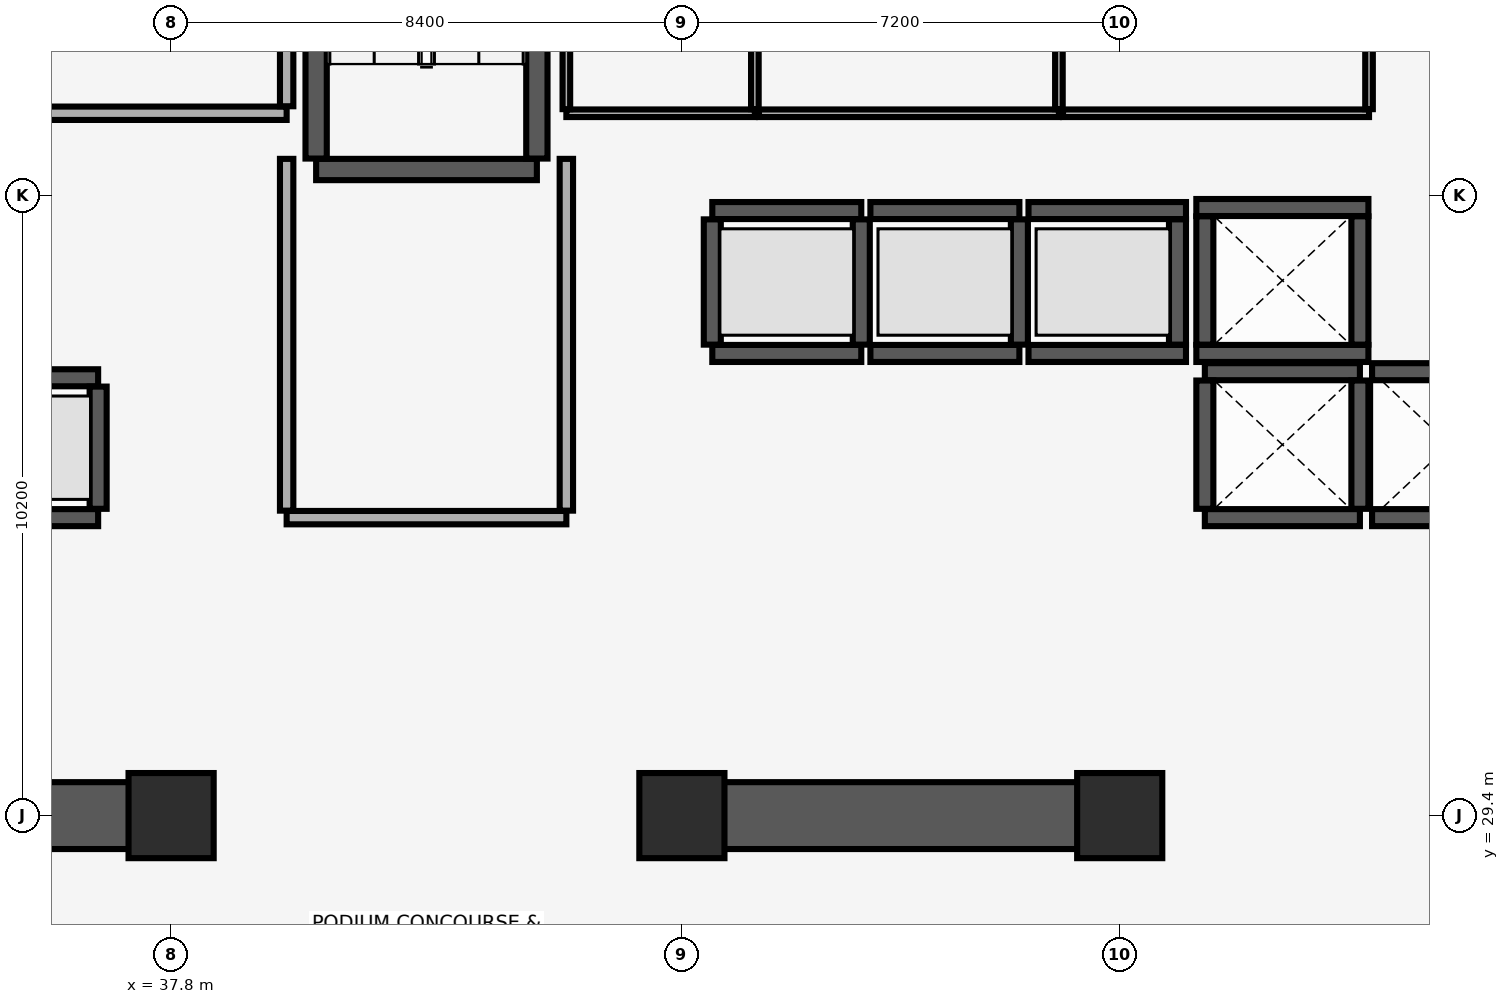
"""IFC4 building model, lengths in metres.
Left out: names, types, materials, properties, quantities, classifications, styles, units other than length and angle.
Written with IfcOpenShell. Run it as: python <this file> out.ifc"""

import sys

from ifc_helpers import new_model, si_unit, direction, frame, frame_2d, origin, origin_2d, place, context, subcontext, project, spatial, rectangle, extrude, element, fill, save


model = new_model("IFC4")
c1 = context("Model", 3, precision=1e-05, world=origin(), true_north=direction((0.0, 1.0)))
c2 = subcontext(c1, "Body", "Model", "MODEL_VIEW")
j1 = project(units=[si_unit("LENGTHUNIT", "METRE"), si_unit("PLANEANGLEUNIT", "RADIAN")], contexts=[c1])
p1 = place(None, origin())
s1 = spatial("IfcSite", under=j1, at=p1, CompositionType="ELEMENT")
p2 = place(p1, origin())
s2 = spatial("IfcBuilding", under=s1, at=p2, CompositionType="ELEMENT")
p3 = place(p2, frame((0.0, 0.0, 8.0)))
s3 = spatial("IfcBuildingStorey", under=s2, at=p3, CompositionType="ELEMENT", Elevation=8.0)
for number, where, z_axis, x_axis in (
    (1, (37.8, 29.4, 0.0), (0.0, 0.0, 1.0), (1.0, 0.0, 0.0)),
    (2, (46.2, 29.4, 0.0), (0.0, 0.0, 1.0), (1.0, 0.0, 0.0)),
    (3, (53.4, 29.4, 0.0), (0.0, 0.0, 1.0), (1.0, 0.0, 0.0)),
):
    element("IfcColumn", number, at=place(p3, frame(where, z_axis=z_axis, x_axis=x_axis)), inside=s3, PredefinedType="COLUMN", context=c2, shape_type="SweptSolid", body=[
        extrude(rectangle(XDim=1.4, YDim=1.4, at=origin_2d()), origin(), (0.0, 0.0, 1.0), 5.68),
    ])
for number, where, z_axis, x_axis in (
    (4, (30.4, 29.4, 0.0), (0.0, 0.0, 1.0), (1.0, 0.0, 0.0)),
    (5, (46.0, 29.4, 0.0), (0.0, 0.0, 1.0), (1.0, 0.0, 0.0)),
):
    element("IfcWall", number, at=place(p3, frame(where, z_axis=z_axis, x_axis=x_axis)), inside=s3, PredefinedType="SHEAR", context=c2, shape_type="SweptSolid", body=[
        extrude(rectangle(XDim=7.6, YDim=1.1, at=frame_2d((3.8, 0.0))), origin(), (0.0, 0.0, 1.0), 5.68),
    ])
p4 = place(p3, frame((40.185, 40.025, 0.0), z_axis=(0.0, 0.0, 1.0), x_axis=(1.0, 0.0, 0.0)))
e6 = element("IfcWall", 6, at=p4, inside=s3, PredefinedType="SHEAR", context=c2, shape_type="SweptSolid", body=[
    extrude(rectangle(XDim=3.63, YDim=0.35, at=frame_2d((1.815, 0.0))), origin(), (0.0, 0.0, 1.0), 5.68),
])
p5 = place(p4, frame((1.24, 0.0, 0.0)))
e7 = element("IfcOpeningElement", 7, at=p5, cuts=e6, PredefinedType="OPENING", context=c2, shape_type="SweptSolid", body=[
    extrude(rectangle(XDim=1.15, YDim=2.15, at=frame_2d((0.575, 1.075))), frame((0.0, 0.185, 0.0), z_axis=(0.0, -1.0, 0.0), x_axis=(1.0, 0.0, 0.0)), (0.0, 0.0, 1.0), 0.37),
])
for number, where, z_axis, x_axis in (
    (8, (40.185, 40.205, 0.0), (0.0, 0.0, 1.0), (0.0, 1.0, 0.0)),
    (9, (43.815, 40.205, 0.0), (0.0, 0.0, 1.0), (0.0, 1.0, 0.0)),
):
    element("IfcWall", number, at=place(p3, frame(where, z_axis=z_axis, x_axis=x_axis)), inside=s3, PredefinedType="SHEAR", context=c2, shape_type="SweptSolid", body=[
        extrude(rectangle(XDim=8.09, YDim=0.35, at=frame_2d((4.045, 0.0))), origin(), (0.0, 0.0, 1.0), 5.68),
    ])
p6 = place(p3, frame((46.7, 37.0, 0.0), z_axis=(0.0, 0.0, 1.0), x_axis=(1.0, 0.0, 0.0)))
e10 = element("IfcWall", 10, at=p6, inside=s3, PredefinedType="SHEAR", context=c2, shape_type="SweptSolid", body=[
    extrude(rectangle(XDim=2.45, YDim=0.28, at=frame_2d((1.225, 0.0))), origin(), (0.0, 0.0, 1.0), 5.68),
])
p7 = place(p3, frame((46.7, 39.35, 0.0), z_axis=(0.0, 0.0, 1.0), x_axis=(1.0, 0.0, 0.0)))
e11 = element("IfcWall", 11, at=p7, inside=s3, PredefinedType="SHEAR", context=c2, shape_type="SweptSolid", body=[
    extrude(rectangle(XDim=2.45, YDim=0.28, at=frame_2d((1.225, 0.0))), origin(), (0.0, 0.0, 1.0), 5.68),
])
p8 = place(p7, frame((0.625, 0.0, 0.0)))
e12 = element("IfcOpeningElement", 12, at=p8, cuts=e11, PredefinedType="OPENING", context=c2, shape_type="SweptSolid", body=[
    extrude(rectangle(XDim=1.2, YDim=2.25, at=frame_2d((0.6, 1.125))), frame((0.0, 0.15, 0.0), z_axis=(0.0, -1.0, 0.0), x_axis=(1.0, 0.0, 0.0)), (0.0, 0.0, 1.0), 0.3),
])
for number, where, z_axis, x_axis in (
    (13, (46.7, 37.145, 0.0), (0.0, 0.0, 1.0), (0.0, 1.0, 0.0)),
    (14, (49.15, 37.145, 0.0), (0.0, 0.0, 1.0), (0.0, 1.0, 0.0)),
):
    element("IfcWall", number, at=place(p3, frame(where, z_axis=z_axis, x_axis=x_axis)), inside=s3, PredefinedType="SHEAR", context=c2, shape_type="SweptSolid", body=[
        extrude(rectangle(XDim=2.06, YDim=0.28, at=frame_2d((1.03, 0.0))), origin(), (0.0, 0.0, 1.0), 5.68),
    ])
p9 = place(p3, frame((49.3, 37.0, 0.0), z_axis=(0.0, 0.0, 1.0), x_axis=(1.0, 0.0, 0.0)))
e15 = element("IfcWall", 15, at=p9, inside=s3, PredefinedType="SHEAR", context=c2, shape_type="SweptSolid", body=[
    extrude(rectangle(XDim=2.45, YDim=0.28, at=frame_2d((1.225, 0.0))), origin(), (0.0, 0.0, 1.0), 5.68),
])
p10 = place(p3, frame((49.3, 39.35, 0.0), z_axis=(0.0, 0.0, 1.0), x_axis=(1.0, 0.0, 0.0)))
e16 = element("IfcWall", 16, at=p10, inside=s3, PredefinedType="SHEAR", context=c2, shape_type="SweptSolid", body=[
    extrude(rectangle(XDim=2.45, YDim=0.28, at=frame_2d((1.225, 0.0))), origin(), (0.0, 0.0, 1.0), 5.68),
])
p11 = place(p10, frame((0.625, 0.0, 0.0)))
e17 = element("IfcOpeningElement", 17, at=p11, cuts=e16, PredefinedType="OPENING", context=c2, shape_type="SweptSolid", body=[
    extrude(rectangle(XDim=1.2, YDim=2.25, at=frame_2d((0.6, 1.125))), frame((0.0, 0.15, 0.0), z_axis=(0.0, -1.0, 0.0), x_axis=(1.0, 0.0, 0.0)), (0.0, 0.0, 1.0), 0.3),
])
p12 = place(p3, frame((51.75, 37.145, 0.0), z_axis=(0.0, 0.0, 1.0), x_axis=(0.0, 1.0, 0.0)))
e18 = element("IfcWall", 18, at=p12, inside=s3, PredefinedType="SHEAR", context=c2, shape_type="SweptSolid", body=[
    extrude(rectangle(XDim=2.06, YDim=0.28, at=frame_2d((1.03, 0.0))), origin(), (0.0, 0.0, 1.0), 5.68),
])
p13 = place(p3, frame((51.9, 37.0, 0.0), z_axis=(0.0, 0.0, 1.0), x_axis=(1.0, 0.0, 0.0)))
e19 = element("IfcWall", 19, at=p13, inside=s3, PredefinedType="SHEAR", context=c2, shape_type="SweptSolid", body=[
    extrude(rectangle(XDim=2.59, YDim=0.28, at=frame_2d((1.295, 0.0))), origin(), (0.0, 0.0, 1.0), 5.68),
])
p14 = place(p3, frame((51.9, 39.35, 0.0), z_axis=(0.0, 0.0, 1.0), x_axis=(1.0, 0.0, 0.0)))
e20 = element("IfcWall", 20, at=p14, inside=s3, PredefinedType="SHEAR", context=c2, shape_type="SweptSolid", body=[
    extrude(rectangle(XDim=2.59, YDim=0.28, at=frame_2d((1.295, 0.0))), origin(), (0.0, 0.0, 1.0), 5.68),
])
p15 = place(p14, frame((0.625, 0.0, 0.0)))
e21 = element("IfcOpeningElement", 21, at=p15, cuts=e20, PredefinedType="OPENING", context=c2, shape_type="SweptSolid", body=[
    extrude(rectangle(XDim=1.2, YDim=2.25, at=frame_2d((0.6, 1.125))), frame((0.0, 0.15, 0.0), z_axis=(0.0, -1.0, 0.0), x_axis=(1.0, 0.0, 0.0)), (0.0, 0.0, 1.0), 0.3),
])
p16 = place(p3, frame((54.35, 37.145, 0.0), z_axis=(0.0, 0.0, 1.0), x_axis=(0.0, 1.0, 0.0)))
e22 = element("IfcWall", 22, at=p16, inside=s3, PredefinedType="SHEAR", context=c2, shape_type="SweptSolid", body=[
    extrude(rectangle(XDim=2.06, YDim=0.28, at=frame_2d((1.03, 0.0))), origin(), (0.0, 0.0, 1.0), 5.68),
])
for number, where, z_axis, x_axis in (
    (23, (54.8, 34.3, 0.0), (0.0, 0.0, 1.0), (1.0, 0.0, 0.0)),
    (24, (54.8, 36.7, 0.0), (0.0, 0.0, 1.0), (1.0, 0.0, 0.0)),
):
    element("IfcWall", number, at=place(p3, frame(where, z_axis=z_axis, x_axis=x_axis)), inside=s3, PredefinedType="SHEAR", context=c2, shape_type="SweptSolid", body=[
        extrude(rectangle(XDim=2.55, YDim=0.28, at=frame_2d((1.275, 0.0))), origin(), (0.0, 0.0, 1.0), 5.68),
    ])
for number, where, z_axis, x_axis in (
    (25, (54.8, 34.445, 0.0), (0.0, 0.0, 1.0), (0.0, 1.0, 0.0)),
    (26, (57.35, 34.445, 0.0), (0.0, 0.0, 1.0), (0.0, 1.0, 0.0)),
):
    element("IfcWall", number, at=place(p3, frame(where, z_axis=z_axis, x_axis=x_axis)), inside=s3, PredefinedType="SHEAR", context=c2, shape_type="SweptSolid", body=[
        extrude(rectangle(XDim=2.11, YDim=0.28, at=frame_2d((1.055, 0.0))), origin(), (0.0, 0.0, 1.0), 5.68),
    ])
for number, where, z_axis, x_axis in (
    (27, (57.55, 34.3, 0.0), (0.0, 0.0, 1.0), (1.0, 0.0, 0.0)),
    (28, (57.55, 36.7, 0.0), (0.0, 0.0, 1.0), (1.0, 0.0, 0.0)),
):
    element("IfcWall", number, at=place(p3, frame(where, z_axis=z_axis, x_axis=x_axis)), inside=s3, PredefinedType="SHEAR", context=c2, shape_type="SweptSolid", body=[
        extrude(rectangle(XDim=2.55, YDim=0.28, at=frame_2d((1.275, 0.0))), origin(), (0.0, 0.0, 1.0), 5.68),
    ])
for number, where, z_axis, x_axis in (
    (29, (54.66, 37.0, 0.0), (0.0, 0.0, 1.0), (1.0, 0.0, 0.0)),
    (30, (54.66, 39.4, 0.0), (0.0, 0.0, 1.0), (1.0, 0.0, 0.0)),
):
    element("IfcWall", number, at=place(p3, frame(where, z_axis=z_axis, x_axis=x_axis)), inside=s3, PredefinedType="SHEAR", context=c2, shape_type="SweptSolid", body=[
        extrude(rectangle(XDim=2.83, YDim=0.28, at=frame_2d((1.415, 0.0))), origin(), (0.0, 0.0, 1.0), 5.68),
    ])
for number, where, z_axis, x_axis in (
    (31, (54.8, 37.145, 0.0), (0.0, 0.0, 1.0), (0.0, 1.0, 0.0)),
    (32, (57.35, 37.145, 0.0), (0.0, 0.0, 1.0), (0.0, 1.0, 0.0)),
):
    element("IfcWall", number, at=place(p3, frame(where, z_axis=z_axis, x_axis=x_axis)), inside=s3, PredefinedType="SHEAR", context=c2, shape_type="SweptSolid", body=[
        extrude(rectangle(XDim=2.11, YDim=0.28, at=frame_2d((1.055, 0.0))), origin(), (0.0, 0.0, 1.0), 5.68),
    ])
p17 = place(p3, frame((34.3, 34.3, 0.0), z_axis=(0.0, 0.0, 1.0), x_axis=(1.0, 0.0, 0.0)))
e33 = element("IfcWall", 33, at=p17, inside=s3, PredefinedType="SHEAR", context=c2, shape_type="SweptSolid", body=[
    extrude(rectangle(XDim=2.3, YDim=0.28, at=frame_2d((1.15, 0.0))), origin(), (0.0, 0.0, 1.0), 5.68),
])
p18 = place(p17, frame((0.6, 0.0, 0.0)))
e34 = element("IfcOpeningElement", 34, at=p18, cuts=e33, PredefinedType="OPENING", context=c2, shape_type="SweptSolid", body=[
    extrude(rectangle(XDim=1.1, YDim=2.2, at=frame_2d((0.55, 1.1))), frame((0.0, 0.15, 0.0), z_axis=(0.0, -1.0, 0.0), x_axis=(1.0, 0.0, 0.0)), (0.0, 0.0, 1.0), 0.3),
])
p19 = place(p3, frame((34.3, 36.6, 0.0), z_axis=(0.0, 0.0, 1.0), x_axis=(1.0, 0.0, 0.0)))
e35 = element("IfcWall", 35, at=p19, inside=s3, PredefinedType="SHEAR", context=c2, shape_type="SweptSolid", body=[
    extrude(rectangle(XDim=2.3, YDim=0.28, at=frame_2d((1.15, 0.0))), origin(), (0.0, 0.0, 1.0), 5.68),
])
p20 = place(p3, frame((36.6, 34.445, 0.0), z_axis=(0.0, 0.0, 1.0), x_axis=(0.0, 1.0, 0.0)))
e36 = element("IfcWall", 36, at=p20, inside=s3, PredefinedType="SHEAR", context=c2, shape_type="SweptSolid", body=[
    extrude(rectangle(XDim=2.01, YDim=0.28, at=frame_2d((1.005, 0.0))), origin(), (0.0, 0.0, 1.0), 5.68),
])
p21 = place(p3, frame((39.7, 34.3, 0.0), z_axis=(0.0, 0.0, 1.0), x_axis=(1.0, 0.0, 0.0)))
e37 = element("IfcWall", 37, at=p21, inside=s3, PredefinedType="PARTITIONING", context=c2, shape_type="SweptSolid", body=[
    extrude(rectangle(XDim=4.6, YDim=0.22, at=frame_2d((2.3, 0.0))), origin(), (0.0, 0.0, 1.0), 5.68),
])
p22 = place(p21, frame((1.7, 0.0, 0.0)))
e38 = element("IfcOpeningElement", 38, at=p22, cuts=e37, PredefinedType="OPENING", context=c2, shape_type="SweptSolid", body=[
    extrude(rectangle(XDim=1.2, YDim=2.15, at=frame_2d((0.6, 1.075))), frame((0.0, 0.12, 0.0), z_axis=(0.0, -1.0, 0.0), x_axis=(1.0, 0.0, 0.0)), (0.0, 0.0, 1.0), 0.24),
])
for number, where, z_axis, x_axis in (
    (39, (39.7, 34.415, 0.0), (0.0, 0.0, 1.0), (0.0, 1.0, 0.0)),
    (40, (44.3, 34.415, 0.0), (0.0, 0.0, 1.0), (0.0, 1.0, 0.0)),
):
    element("IfcWall", number, at=place(p3, frame(where, z_axis=z_axis, x_axis=x_axis)), inside=s3, PredefinedType="PARTITIONING", context=c2, shape_type="SweptSolid", body=[
        extrude(rectangle(XDim=5.785, YDim=0.22, at=frame_2d((2.893, 0.0))), origin(), (0.0, 0.0, 1.0), 5.68),
    ])
p23 = place(p3, frame((35.18, 40.95, 0.0), z_axis=(0.0, 0.0, 1.0), x_axis=(1.0, 0.0, 0.0)))
e41 = element("IfcWall", 41, at=p23, inside=s3, PredefinedType="PARTITIONING", context=c2, shape_type="SweptSolid", body=[
    extrude(rectangle(XDim=4.52, YDim=0.22, at=frame_2d((2.26, 0.0))), origin(), (0.0, 0.0, 1.0), 5.68),
])
p24 = place(p23, frame((0.795, 0.0, 0.0)))
e42 = element("IfcOpeningElement", 42, at=p24, cuts=e41, PredefinedType="OPENING", context=c2, shape_type="SweptSolid", body=[
    extrude(rectangle(XDim=0.85, YDim=2.1, at=frame_2d((0.425, 1.05))), frame((0.0, 0.12, 0.0), z_axis=(0.0, -1.0, 0.0), x_axis=(1.0, 0.0, 0.0)), (0.0, 0.0, 1.0), 0.24),
])
p25 = place(p3, frame((39.7, 41.065, 0.0), z_axis=(0.0, 0.0, 1.0), x_axis=(0.0, 1.0, 0.0)))
e43 = element("IfcWall", 43, at=p25, inside=s3, PredefinedType="PARTITIONING", context=c2, shape_type="SweptSolid", body=[
    extrude(rectangle(XDim=7.12, YDim=0.22, at=frame_2d((3.56, 0.0))), origin(), (0.0, 0.0, 1.0), 5.68),
])
p26 = place(p3, frame((44.3, 40.95, 0.0), z_axis=(0.0, 0.0, 1.0), x_axis=(1.0, 0.0, 0.0)))
e44 = element("IfcWall", 44, at=p26, inside=s3, PredefinedType="PARTITIONING", context=c2, shape_type="SweptSolid", body=[
    extrude(rectangle(XDim=3.1, YDim=0.125, at=frame_2d((1.55, 0.0))), origin(), (0.0, 0.0, 1.0), 5.68),
])
p27 = place(p26, frame((1.1, 0.0, 0.0)))
e45 = element("IfcOpeningElement", 45, at=p27, cuts=e44, PredefinedType="OPENING", context=c2, shape_type="SweptSolid", body=[
    extrude(rectangle(XDim=0.9, YDim=2.1, at=frame_2d((0.45, 1.05))), frame((0.0, 0.073, 0.0), z_axis=(0.0, -1.0, 0.0), x_axis=(1.0, 0.0, 0.0)), (0.0, 0.0, 1.0), 0.145),
])
for number, where, z_axis, x_axis in (
    (46, (44.3, 41.018, 0.0), (0.0, 0.0, 1.0), (0.0, 1.0, 0.0)),
    (47, (47.4, 41.018, 0.0), (0.0, 0.0, 1.0), (0.0, 1.0, 0.0)),
):
    element("IfcWall", number, at=place(p3, frame(where, z_axis=z_axis, x_axis=x_axis)), inside=s3, PredefinedType="PARTITIONING", context=c2, shape_type="SweptSolid", body=[
        extrude(rectangle(XDim=7.215, YDim=0.125, at=frame_2d((3.607, 0.0))), origin(), (0.0, 0.0, 1.0), 5.68),
    ])
p28 = place(p3, frame((47.468, 40.95, 0.0), z_axis=(0.0, 0.0, 1.0), x_axis=(1.0, 0.0, 0.0)))
e48 = element("IfcWall", 48, at=p28, inside=s3, PredefinedType="PARTITIONING", context=c2, shape_type="SweptSolid", body=[
    extrude(rectangle(XDim=4.932, YDim=0.125, at=frame_2d((2.466, 0.0))), origin(), (0.0, 0.0, 1.0), 5.68),
])
p29 = place(p28, frame((1.982, 0.0, 0.0)))
e49 = element("IfcOpeningElement", 49, at=p29, cuts=e48, PredefinedType="OPENING", context=c2, shape_type="SweptSolid", body=[
    extrude(rectangle(XDim=0.9, YDim=2.1, at=frame_2d((0.45, 1.05))), frame((0.0, 0.073, 0.0), z_axis=(0.0, -1.0, 0.0), x_axis=(1.0, 0.0, 0.0)), (0.0, 0.0, 1.0), 0.145),
])
p30 = place(p3, frame((52.4, 41.018, 0.0), z_axis=(0.0, 0.0, 1.0), x_axis=(0.0, 1.0, 0.0)))
e50 = element("IfcWall", 50, at=p30, inside=s3, PredefinedType="PARTITIONING", context=c2, shape_type="SweptSolid", body=[
    extrude(rectangle(XDim=7.215, YDim=0.125, at=frame_2d((3.607, 0.0))), origin(), (0.0, 0.0, 1.0), 5.68),
])
p31 = place(p3, frame((52.468, 40.95, 0.0), z_axis=(0.0, 0.0, 1.0), x_axis=(1.0, 0.0, 0.0)))
e51 = element("IfcWall", 51, at=p31, inside=s3, PredefinedType="PARTITIONING", context=c2, shape_type="SweptSolid", body=[
    extrude(rectangle(XDim=5.032, YDim=0.125, at=frame_2d((2.516, 0.0))), origin(), (0.0, 0.0, 1.0), 5.68),
])
p32 = place(p31, frame((2.032, 0.0, 0.0)))
e52 = element("IfcOpeningElement", 52, at=p32, cuts=e51, PredefinedType="OPENING", context=c2, shape_type="SweptSolid", body=[
    extrude(rectangle(XDim=0.9, YDim=2.1, at=frame_2d((0.45, 1.05))), frame((0.0, 0.073, 0.0), z_axis=(0.0, -1.0, 0.0), x_axis=(1.0, 0.0, 0.0)), (0.0, 0.0, 1.0), 0.145),
])
p33 = place(p3, frame((57.5, 41.018, 0.0), z_axis=(0.0, 0.0, 1.0), x_axis=(0.0, 1.0, 0.0)))
e53 = element("IfcWall", 53, at=p33, inside=s3, PredefinedType="PARTITIONING", context=c2, shape_type="SweptSolid", body=[
    extrude(rectangle(XDim=2.167, YDim=0.125, at=frame_2d((1.084, 0.0))), origin(), (0.0, 0.0, 1.0), 5.68),
])
p34 = place(p5, origin())
e54 = element("IfcDoor", 54, at=p34, inside=s3, OperationType="SINGLE_SWING_RIGHT", PredefinedType="DOOR", context=c2, shape_type="SweptSolid", body=[
    extrude(rectangle(XDim=1.15, YDim=2.15, at=frame_2d((0.575, 1.075))), frame((0.0, 0.025, 0.0), z_axis=(0.0, -1.0, 0.0), x_axis=(1.0, 0.0, 0.0)), (0.0, 0.0, 1.0), 0.05),
])
fill(e7, e54)
p35 = place(p8, origin())
e55 = element("IfcDoor", 55, at=p35, inside=s3, OperationType="DOUBLE_DOOR_SLIDING", PredefinedType="DOOR", context=c2, shape_type="SweptSolid", body=[
    extrude(rectangle(XDim=1.2, YDim=2.25, at=frame_2d((0.6, 1.125))), frame((0.0, 0.025, 0.0), z_axis=(0.0, -1.0, 0.0), x_axis=(1.0, 0.0, 0.0)), (0.0, 0.0, 1.0), 0.05),
])
fill(e12, e55)
p36 = place(p11, origin())
e56 = element("IfcDoor", 56, at=p36, inside=s3, OperationType="DOUBLE_DOOR_SLIDING", PredefinedType="DOOR", context=c2, shape_type="SweptSolid", body=[
    extrude(rectangle(XDim=1.2, YDim=2.25, at=frame_2d((0.6, 1.125))), frame((0.0, 0.025, 0.0), z_axis=(0.0, -1.0, 0.0), x_axis=(1.0, 0.0, 0.0)), (0.0, 0.0, 1.0), 0.05),
])
fill(e17, e56)
p37 = place(p15, origin())
e57 = element("IfcDoor", 57, at=p37, inside=s3, OperationType="DOUBLE_DOOR_SLIDING", PredefinedType="DOOR", context=c2, shape_type="SweptSolid", body=[
    extrude(rectangle(XDim=1.2, YDim=2.25, at=frame_2d((0.6, 1.125))), frame((0.0, 0.025, 0.0), z_axis=(0.0, -1.0, 0.0), x_axis=(1.0, 0.0, 0.0)), (0.0, 0.0, 1.0), 0.05),
])
fill(e21, e57)
p38 = place(p18, origin())
e58 = element("IfcDoor", 58, at=p38, inside=s3, OperationType="DOUBLE_DOOR_SLIDING", PredefinedType="DOOR", context=c2, shape_type="SweptSolid", body=[
    extrude(rectangle(XDim=1.1, YDim=2.2, at=frame_2d((0.55, 1.1))), frame((0.0, 0.025, 0.0), z_axis=(0.0, -1.0, 0.0), x_axis=(1.0, 0.0, 0.0)), (0.0, 0.0, 1.0), 0.05),
])
fill(e34, e58)
p39 = place(p22, origin())
e59 = element("IfcDoor", 59, at=p39, inside=s3, OperationType="SINGLE_SWING_LEFT", PredefinedType="DOOR", context=c2, shape_type="SweptSolid", body=[
    extrude(rectangle(XDim=1.2, YDim=2.15, at=frame_2d((0.6, 1.075))), frame((0.0, 0.025, 0.0), z_axis=(0.0, -1.0, 0.0), x_axis=(1.0, 0.0, 0.0)), (0.0, 0.0, 1.0), 0.05),
])
fill(e38, e59)
p40 = place(p24, origin())
e60 = element("IfcDoor", 60, at=p40, inside=s3, OperationType="SINGLE_SWING_LEFT", PredefinedType="DOOR", context=c2, shape_type="SweptSolid", body=[
    extrude(rectangle(XDim=0.85, YDim=2.1, at=frame_2d((0.425, 1.05))), frame((0.0, 0.025, 0.0), z_axis=(0.0, -1.0, 0.0), x_axis=(1.0, 0.0, 0.0)), (0.0, 0.0, 1.0), 0.05),
])
fill(e42, e60)
p41 = place(p27, origin())
e61 = element("IfcDoor", 61, at=p41, inside=s3, OperationType="SINGLE_SWING_RIGHT", PredefinedType="DOOR", context=c2, shape_type="SweptSolid", body=[
    extrude(rectangle(XDim=0.9, YDim=2.1, at=frame_2d((0.45, 1.05))), frame((0.0, 0.025, 0.0), z_axis=(0.0, -1.0, 0.0), x_axis=(1.0, 0.0, 0.0)), (0.0, 0.0, 1.0), 0.05),
])
fill(e45, e61)
p42 = place(p29, origin())
e62 = element("IfcDoor", 62, at=p42, inside=s3, OperationType="SINGLE_SWING_LEFT", PredefinedType="DOOR", context=c2, shape_type="SweptSolid", body=[
    extrude(rectangle(XDim=0.9, YDim=2.1, at=frame_2d((0.45, 1.05))), frame((0.0, 0.025, 0.0), z_axis=(0.0, -1.0, 0.0), x_axis=(1.0, 0.0, 0.0)), (0.0, 0.0, 1.0), 0.05),
])
fill(e49, e62)
p43 = place(p32, origin())
e63 = element("IfcDoor", 63, at=p43, inside=s3, OperationType="SINGLE_SWING_RIGHT", PredefinedType="DOOR", context=c2, shape_type="SweptSolid", body=[
    extrude(rectangle(XDim=0.9, YDim=2.1, at=frame_2d((0.45, 1.05))), frame((0.0, 0.025, 0.0), z_axis=(0.0, -1.0, 0.0), x_axis=(1.0, 0.0, 0.0)), (0.0, 0.0, 1.0), 0.05),
])
fill(e52, e63)
save(model, sys.argv[1])
